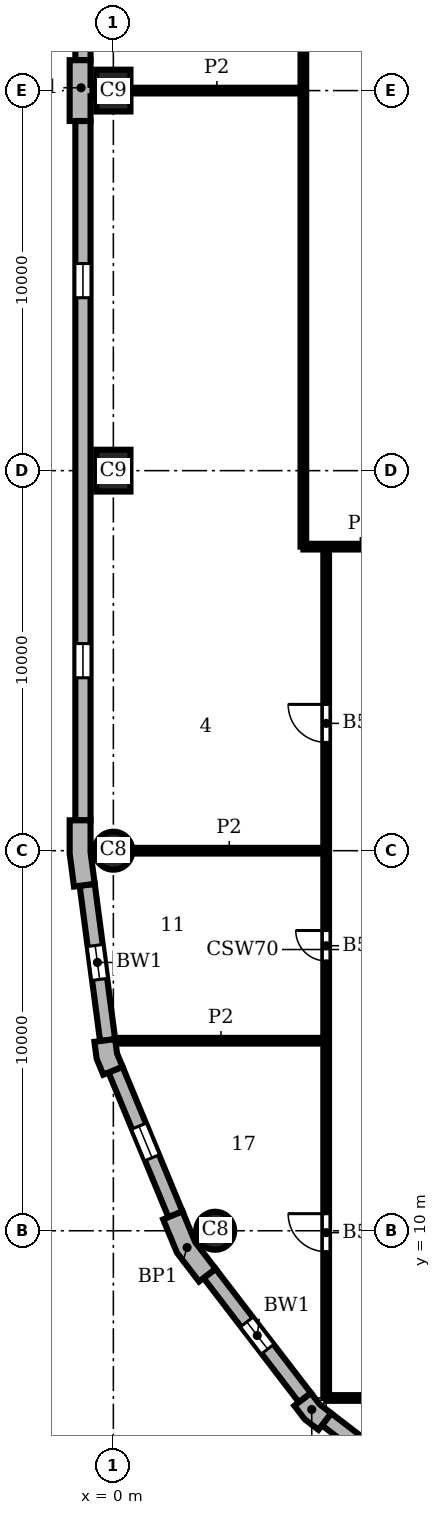
"""IFC4 building model, lengths in metres.
Left out: names, types, materials, properties, quantities, classifications, styles, units other than length and angle.
Written with IfcOpenShell. Run it as: python <this file> out.ifc"""

import sys

from ifc_helpers import new_model, si_unit, direction, frame, frame_2d, origin, origin_2d, place, context, subcontext, project, spatial, polyline, rectangle, circle, outline, extrude, element, fill, save


model = new_model("IFC4")
c1 = context("Model", 3, precision=1e-05, world=origin(), true_north=direction((0.0, 1.0)))
c2 = subcontext(c1, "Body", "Model", "MODEL_VIEW")
j1 = project(units=[si_unit("LENGTHUNIT", "METRE"), si_unit("PLANEANGLEUNIT", "RADIAN")], contexts=[c1])
p1 = place(None, origin())
s1 = spatial("IfcSite", under=j1, at=p1, CompositionType="ELEMENT")
p2 = place(p1, origin())
s2 = spatial("IfcBuilding", under=s1, at=p2, CompositionType="ELEMENT")
p3 = place(p2, frame((0.0, 0.0, 178.5)))
s3 = spatial("IfcBuildingStorey", under=s2, at=p3, CompositionType="ELEMENT", Elevation=178.5)
for number, where, z_axis, x_axis in (
    (1, (0.0, 40.0, 0.0), (0.0, 0.0, 1.0), (0.0, 1.0, 0.0)),
    (2, (0.0, 30.0, 0.0), (0.0, 0.0, 1.0), (0.0, 1.0, 0.0)),
):
    element("IfcColumn", number, at=place(p3, frame(where, z_axis=z_axis, x_axis=x_axis)), inside=s3, PredefinedType="COLUMN", context=c2, shape_type="SweptSolid", body=[
        extrude(rectangle(XDim=1.1, YDim=0.9, at=origin_2d()), origin(), (0.0, 0.0, 1.0), 3.9),
    ])
for number, where, z_axis, x_axis in (
    (3, (0.0, 20.0, 0.0), (0.0, 0.0, 1.0), (1.0, 0.0, 0.0)),
    (4, (2.679, 10.0, 0.0), (0.0, 0.0, 1.0), (1.0, 0.0, 0.0)),
):
    element("IfcColumn", number, at=place(p3, frame(where, z_axis=z_axis, x_axis=x_axis)), inside=s3, PredefinedType="COLUMN", context=c2, shape_type="SweptSolid", body=[
        extrude(circle(Radius=0.5, at=origin_2d()), origin(), (0.0, 0.0, 1.0), 3.9),
    ])
p4 = place(p3, origin())
e5 = element("IfcWall", 5, at=p4, inside=s3, PredefinedType="SOLIDWALL", context=c2, shape_type="SweptSolid", body=[
    extrude(outline(polyline([(-0.6, 39.2), (-0.6, 39.85), (-0.55, 39.85), (-0.55, 40.15), (-0.6, 40.15), (-0.6, 40.8), (-1.0, 40.8), (-1.15, 40.8), (-1.15, 40.0), (-1.15, 39.2), (-1.0, 39.2), (-0.6, 39.2)])), origin(), (0.0, 0.0, 1.0), 3.9),
])
e6 = element("IfcWall", 6, at=p4, inside=s3, PredefinedType="SOLIDWALL", context=c2, shape_type="SweptSolid", body=[
    extrude(outline(polyline([(-1.0, 20.8), (-1.15, 20.8), (-1.15, 19.925), (-1.036, 19.057), (-0.887, 19.076), (-0.49, 19.128), (-0.6, 19.961), (-0.6, 20.8), (-1.0, 20.8)])), origin(), (0.0, 0.0, 1.0), 3.9),
])
e7 = element("IfcWall", 7, at=p4, inside=s3, PredefinedType="SOLIDWALL", context=c2, shape_type="SweptSolid", body=[
    extrude(outline(polyline([(-0.349, 14.99), (-0.498, 14.971), (-0.439, 14.523), (-0.266, 14.106), (-0.128, 14.164), (0.242, 14.317), (0.097, 14.667), (0.047, 15.043), (-0.349, 14.99)])), origin(), (0.0, 0.0, 1.0), 3.9),
])
e8 = element("IfcWall", 8, at=p4, inside=s3, PredefinedType="SOLIDWALL", context=c2, shape_type="SweptSolid", body=[
    extrude(outline(polyline([(1.449, 10.356), (1.311, 10.299), (1.675, 9.42), (2.254, 8.665), (2.373, 8.757), (2.69, 9.0), (2.155, 9.698), (1.819, 10.51), (1.449, 10.356)])), origin(), (0.0, 0.0, 1.0), 3.9),
])
e9 = element("IfcWall", 9, at=p4, inside=s3, PredefinedType="SOLIDWALL", context=c2, shape_type="SweptSolid", body=[
    extrude(outline(polyline([(4.882, 5.487), (4.763, 5.396), (5.038, 5.038), (5.396, 4.763), (5.487, 4.882), (5.731, 5.199), (5.43, 5.43), (5.199, 5.731), (4.882, 5.487)])), origin(), (0.0, 0.0, 1.0), 3.9),
])
p5 = place(p3, frame((-0.8, 59.2, 0.0), z_axis=(0.0, 0.0, 1.0), x_axis=(0.0, -1.0, 0.0)))
e10 = element("IfcWall", 10, at=p5, inside=s3, PredefinedType="SOLIDWALL", context=c2, shape_type="SweptSolid", body=[
    extrude(rectangle(XDim=18.4, YDim=0.4, at=frame_2d((9.2, 0.0))), origin(), (0.0, 0.0, 1.0), 3.9),
])
p6 = place(p5, frame((3.75, 0.0, 0.9)))
e11 = element("IfcOpeningElement", 11, at=p6, cuts=e10, PredefinedType="OPENING", context=c2, shape_type="SweptSolid", body=[
    extrude(rectangle(XDim=0.9, YDim=2.35, at=frame_2d((0.45, 1.175))), frame((0.0, 0.21, 0.0), z_axis=(0.0, -1.0, 0.0), x_axis=(1.0, 0.0, 0.0)), (0.0, 0.0, 1.0), 0.42),
])
p7 = place(p5, frame((13.75, 0.0, 0.9)))
e12 = element("IfcOpeningElement", 12, at=p7, cuts=e10, PredefinedType="OPENING", context=c2, shape_type="SweptSolid", body=[
    extrude(rectangle(XDim=0.9, YDim=2.35, at=frame_2d((0.45, 1.175))), frame((0.0, 0.21, 0.0), z_axis=(0.0, -1.0, 0.0), x_axis=(1.0, 0.0, 0.0)), (0.0, 0.0, 1.0), 0.42),
])
p8 = place(p3, frame((-0.8, 39.2, 0.0), z_axis=(0.0, 0.0, 1.0), x_axis=(0.0, -1.0, 0.0)))
e13 = element("IfcWall", 13, at=p8, inside=s3, PredefinedType="SOLIDWALL", context=c2, shape_type="SweptSolid", body=[
    extrude(rectangle(XDim=18.4, YDim=0.4, at=frame_2d((9.2, 0.0))), origin(), (0.0, 0.0, 1.0), 3.9),
])
p9 = place(p8, frame((3.75, 0.0, 0.9)))
e14 = element("IfcOpeningElement", 14, at=p9, cuts=e13, PredefinedType="OPENING", context=c2, shape_type="SweptSolid", body=[
    extrude(rectangle(XDim=0.9, YDim=2.35, at=frame_2d((0.45, 1.175))), frame((0.0, 0.21, 0.0), z_axis=(0.0, -1.0, 0.0), x_axis=(1.0, 0.0, 0.0)), (0.0, 0.0, 1.0), 0.42),
])
p10 = place(p8, frame((13.75, 0.0, 0.9)))
e15 = element("IfcOpeningElement", 15, at=p10, cuts=e13, PredefinedType="OPENING", context=c2, shape_type="SweptSolid", body=[
    extrude(rectangle(XDim=0.9, YDim=2.35, at=frame_2d((0.45, 1.175))), frame((0.0, 0.21, 0.0), z_axis=(0.0, -1.0, 0.0), x_axis=(1.0, 0.0, 0.0)), (0.0, 0.0, 1.0), 0.42),
])
p11 = place(p3, frame((-0.689, 19.102, 0.0), z_axis=(0.0, 0.0, 1.0), x_axis=(0.130514280502, -0.991446429508, 0.0)))
e16 = element("IfcWall", 16, at=p11, inside=s3, PredefinedType="SOLIDWALL", context=c2, shape_type="SweptSolid", body=[
    extrude(rectangle(XDim=4.121, YDim=0.4, at=frame_2d((2.061, 0.0))), origin(), (0.0, 0.0, 1.0), 3.9),
])
p12 = place(p11, frame((1.611, 0.0, 0.9)))
e17 = element("IfcOpeningElement", 17, at=p12, cuts=e16, PredefinedType="OPENING", context=c2, shape_type="SweptSolid", body=[
    extrude(rectangle(XDim=0.9, YDim=2.35, at=frame_2d((0.45, 1.175))), frame((0.0, 0.21, 0.0), z_axis=(0.0, -1.0, 0.0), x_axis=(1.0, 0.0, 0.0)), (0.0, 0.0, 1.0), 0.42),
])
p13 = place(p3, frame((0.057, 14.24, 0.0), z_axis=(0.0, 0.0, 1.0), x_axis=(0.382721546029, -0.923863744394, 0.0)))
e18 = element("IfcWall", 18, at=p13, inside=s3, PredefinedType="SOLIDWALL", context=c2, shape_type="SweptSolid", body=[
    extrude(rectangle(XDim=4.121, YDim=0.4, at=frame_2d((2.061, 0.0))), origin(), (0.0, 0.0, 1.0), 3.9),
])
p14 = place(p13, frame((1.611, 0.0, 0.9)))
e19 = element("IfcOpeningElement", 19, at=p14, cuts=e18, PredefinedType="OPENING", context=c2, shape_type="SweptSolid", body=[
    extrude(rectangle(XDim=0.9, YDim=2.35, at=frame_2d((0.45, 1.175))), frame((0.0, 0.21, 0.0), z_axis=(0.0, -1.0, 0.0), x_axis=(1.0, 0.0, 0.0)), (0.0, 0.0, 1.0), 0.42),
])
p15 = place(p3, frame((2.532, 8.878, 0.0), z_axis=(0.0, 0.0, 1.0), x_axis=(0.608759824817, -0.793354571229, 0.0)))
e20 = element("IfcWall", 20, at=p15, inside=s3, PredefinedType="SOLIDWALL", context=c2, shape_type="SweptSolid", body=[
    extrude(rectangle(XDim=4.121, YDim=0.4, at=frame_2d((2.061, 0.0))), origin(), (0.0, 0.0, 1.0), 3.9),
])
p16 = place(p15, frame((1.611, 0.0, 0.9)))
e21 = element("IfcOpeningElement", 21, at=p16, cuts=e20, PredefinedType="OPENING", context=c2, shape_type="SweptSolid", body=[
    extrude(rectangle(XDim=0.9, YDim=2.35, at=frame_2d((0.45, 1.175))), frame((0.0, 0.21, 0.0), z_axis=(0.0, -1.0, 0.0), x_axis=(1.0, 0.0, 0.0)), (0.0, 0.0, 1.0), 0.42),
])
p17 = place(p3, frame((5.609, 5.041, 0.0), z_axis=(0.0, 0.0, 1.0), x_axis=(0.793354571229, -0.608759824817, 0.0)))
e22 = element("IfcWall", 22, at=p17, inside=s3, PredefinedType="SOLIDWALL", context=c2, shape_type="SweptSolid", body=[
    extrude(rectangle(XDim=4.121, YDim=0.4, at=frame_2d((2.061, 0.0))), origin(), (0.0, 0.0, 1.0), 3.9),
])
p18 = place(p17, frame((1.611, 0.0, 0.9)))
e23 = element("IfcOpeningElement", 23, at=p18, cuts=e22, PredefinedType="OPENING", context=c2, shape_type="SweptSolid", body=[
    extrude(rectangle(XDim=0.9, YDim=2.35, at=frame_2d((0.45, 1.175))), frame((0.0, 0.21, 0.0), z_axis=(0.0, -1.0, 0.0), x_axis=(1.0, 0.0, 0.0)), (0.0, 0.0, 1.0), 0.42),
])
p19 = place(p3, frame((5.0, 28.0, 0.0), z_axis=(0.0, 0.0, 1.0), x_axis=(0.0, 1.0, 0.0)))
e24 = element("IfcWall", 24, at=p19, inside=s3, PredefinedType="PARTITIONING", context=c2, shape_type="SweptSolid", body=[
    extrude(rectangle(XDim=29.6, YDim=0.15, at=frame_2d((14.8, 0.0))), origin(), (0.0, 0.0, 1.0), 3.58),
])
p20 = place(p3, frame((5.6, 5.6, 0.0), z_axis=(0.0, 0.0, 1.0), x_axis=(0.0, 1.0, 0.0)))
e25 = element("IfcWall", 25, at=p20, inside=s3, PredefinedType="PARTITIONING", context=c2, shape_type="SweptSolid", body=[
    extrude(rectangle(XDim=22.4, YDim=0.15, at=frame_2d((11.2, 0.0))), origin(), (0.0, 0.0, 1.0), 3.58),
])
p21 = place(p20, frame((3.85, 0.0, 0.0)))
e26 = element("IfcOpeningElement", 26, at=p21, cuts=e25, PredefinedType="OPENING", context=c2, shape_type="SweptSolid", body=[
    extrude(rectangle(XDim=1.0, YDim=2.1, at=frame_2d((0.5, 1.05))), frame((0.0, 0.085, 0.0), z_axis=(0.0, -1.0, 0.0), x_axis=(1.0, 0.0, 0.0)), (0.0, 0.0, 1.0), 0.17),
])
p22 = place(p20, frame((11.5, 0.0, 0.0)))
e27 = element("IfcOpeningElement", 27, at=p22, cuts=e25, PredefinedType="OPENING", context=c2, shape_type="SweptSolid", body=[
    extrude(rectangle(XDim=0.8, YDim=2.1, at=frame_2d((0.4, 1.05))), frame((0.0, 0.085, 0.0), z_axis=(0.0, -1.0, 0.0), x_axis=(1.0, 0.0, 0.0)), (0.0, 0.0, 1.0), 0.17),
])
p23 = place(p20, frame((17.25, 0.0, 0.0)))
e28 = element("IfcOpeningElement", 28, at=p23, cuts=e25, PredefinedType="OPENING", context=c2, shape_type="SweptSolid", body=[
    extrude(rectangle(XDim=1.0, YDim=2.1, at=frame_2d((0.5, 1.05))), frame((0.0, 0.085, 0.0), z_axis=(0.0, -1.0, 0.0), x_axis=(1.0, 0.0, 0.0)), (0.0, 0.0, 1.0), 0.17),
])
p24 = place(p3, frame((5.6, 5.6, 0.0), z_axis=(0.0, 0.0, 1.0), x_axis=(1.0, 0.0, 0.0)))
e29 = element("IfcWall", 29, at=p24, inside=s3, PredefinedType="PARTITIONING", context=c2, shape_type="SweptSolid", body=[
    extrude(rectangle(XDim=25.4, YDim=0.15, at=frame_2d((12.7, 0.0))), origin(), (0.0, 0.0, 1.0), 3.58),
])
p25 = place(p24, frame((9.35, 0.0, 0.0)))
e30 = element("IfcOpeningElement", 30, at=p25, cuts=e29, PredefinedType="OPENING", context=c2, shape_type="SweptSolid", body=[
    extrude(rectangle(XDim=1.8, YDim=2.1, at=frame_2d((0.9, 1.05))), frame((0.0, 0.085, 0.0), z_axis=(0.0, -1.0, 0.0), x_axis=(1.0, 0.0, 0.0)), (0.0, 0.0, 1.0), 0.17),
])
p26 = place(p3, frame((0.063, 15.0, 0.0), z_axis=(0.0, 0.0, 1.0), x_axis=(1.0, 0.0, 0.0)))
e31 = element("IfcWall", 31, at=p26, inside=s3, PredefinedType="PARTITIONING", context=c2, shape_type="SweptSolid", body=[
    extrude(rectangle(XDim=5.537, YDim=0.15, at=frame_2d((2.769, 0.0))), origin(), (0.0, 0.0, 1.0), 3.58),
])
p27 = place(p3, frame((0.5, 20.0, 0.0), z_axis=(0.0, 0.0, 1.0), x_axis=(1.0, 0.0, 0.0)))
e32 = element("IfcWall", 32, at=p27, inside=s3, PredefinedType="PARTITIONING", context=c2, shape_type="SweptSolid", body=[
    extrude(rectangle(XDim=5.1, YDim=0.15, at=frame_2d((2.55, 0.0))), origin(), (0.0, 0.0, 1.0), 3.58),
])
p28 = place(p3, frame((5.0, 28.0, 0.0), z_axis=(0.0, 0.0, 1.0), x_axis=(1.0, 0.0, 0.0)))
e33 = element("IfcWall", 33, at=p28, inside=s3, PredefinedType="PARTITIONING", context=c2, shape_type="SweptSolid", body=[
    extrude(rectangle(XDim=3.0, YDim=0.15, at=frame_2d((1.5, 0.0))), origin(), (0.0, 0.0, 1.0), 3.58),
])
p29 = place(p3, frame((0.45, 40.0, 0.0), z_axis=(0.0, 0.0, 1.0), x_axis=(1.0, 0.0, 0.0)))
e34 = element("IfcWall", 34, at=p29, inside=s3, PredefinedType="PARTITIONING", context=c2, shape_type="SweptSolid", body=[
    extrude(rectangle(XDim=4.55, YDim=0.15, at=frame_2d((2.275, 0.0))), origin(), (0.0, 0.0, 1.0), 3.58),
])
p30 = place(p9, origin())
e35 = element("IfcWindow", 35, at=p30, inside=s3, PartitioningType="SINGLE_PANEL", PredefinedType="WINDOW", context=c2, shape_type="SweptSolid", body=[
    extrude(rectangle(XDim=0.9, YDim=2.35, at=frame_2d((0.45, 1.175))), frame((0.0, 0.16, 0.0), z_axis=(0.0, -1.0, 0.0), x_axis=(1.0, 0.0, 0.0)), (0.0, 0.0, 1.0), 0.06),
])
fill(e14, e35)
p31 = place(p10, origin())
e36 = element("IfcWindow", 36, at=p31, inside=s3, PartitioningType="SINGLE_PANEL", PredefinedType="WINDOW", context=c2, shape_type="SweptSolid", body=[
    extrude(rectangle(XDim=0.9, YDim=2.35, at=frame_2d((0.45, 1.175))), frame((0.0, 0.16, 0.0), z_axis=(0.0, -1.0, 0.0), x_axis=(1.0, 0.0, 0.0)), (0.0, 0.0, 1.0), 0.06),
])
fill(e15, e36)
p32 = place(p12, origin())
e37 = element("IfcWindow", 37, at=p32, inside=s3, PartitioningType="SINGLE_PANEL", PredefinedType="WINDOW", context=c2, shape_type="SweptSolid", body=[
    extrude(rectangle(XDim=0.9, YDim=2.35, at=frame_2d((0.45, 1.175))), frame((0.0, 0.16, 0.0), z_axis=(0.0, -1.0, 0.0), x_axis=(1.0, 0.0, 0.0)), (0.0, 0.0, 1.0), 0.06),
])
fill(e17, e37)
p33 = place(p14, origin())
e38 = element("IfcWindow", 38, at=p33, inside=s3, PartitioningType="SINGLE_PANEL", PredefinedType="WINDOW", context=c2, shape_type="SweptSolid", body=[
    extrude(rectangle(XDim=0.9, YDim=2.35, at=frame_2d((0.45, 1.175))), frame((0.0, 0.16, 0.0), z_axis=(0.0, -1.0, 0.0), x_axis=(1.0, 0.0, 0.0)), (0.0, 0.0, 1.0), 0.06),
])
fill(e19, e38)
p34 = place(p16, origin())
e39 = element("IfcWindow", 39, at=p34, inside=s3, PartitioningType="SINGLE_PANEL", PredefinedType="WINDOW", context=c2, shape_type="SweptSolid", body=[
    extrude(rectangle(XDim=0.9, YDim=2.35, at=frame_2d((0.45, 1.175))), frame((0.0, 0.16, 0.0), z_axis=(0.0, -1.0, 0.0), x_axis=(1.0, 0.0, 0.0)), (0.0, 0.0, 1.0), 0.06),
])
fill(e21, e39)
p35 = place(p21, origin())
e40 = element("IfcDoor", 40, at=p35, inside=s3, OperationType="SINGLE_SWING_RIGHT", PredefinedType="DOOR", context=c2, shape_type="SweptSolid", body=[
    extrude(rectangle(XDim=1.0, YDim=2.1, at=frame_2d((0.5, 1.05))), frame((0.0, 0.025, 0.0), z_axis=(0.0, -1.0, 0.0), x_axis=(1.0, 0.0, 0.0)), (0.0, 0.0, 1.0), 0.05),
])
fill(e26, e40)
p36 = place(p22, origin())
e41 = element("IfcDoor", 41, at=p36, inside=s3, OperationType="SINGLE_SWING_RIGHT", PredefinedType="DOOR", context=c2, shape_type="SweptSolid", body=[
    extrude(rectangle(XDim=0.8, YDim=2.1, at=frame_2d((0.4, 1.05))), frame((0.0, 0.025, 0.0), z_axis=(0.0, -1.0, 0.0), x_axis=(1.0, 0.0, 0.0)), (0.0, 0.0, 1.0), 0.05),
])
fill(e27, e41)
p37 = place(p23, origin())
e42 = element("IfcDoor", 42, at=p37, inside=s3, OperationType="SINGLE_SWING_RIGHT", PredefinedType="DOOR", context=c2, shape_type="SweptSolid", body=[
    extrude(rectangle(XDim=1.0, YDim=2.1, at=frame_2d((0.5, 1.05))), frame((0.0, 0.025, 0.0), z_axis=(0.0, -1.0, 0.0), x_axis=(1.0, 0.0, 0.0)), (0.0, 0.0, 1.0), 0.05),
])
fill(e28, e42)
save(model, sys.argv[1])
